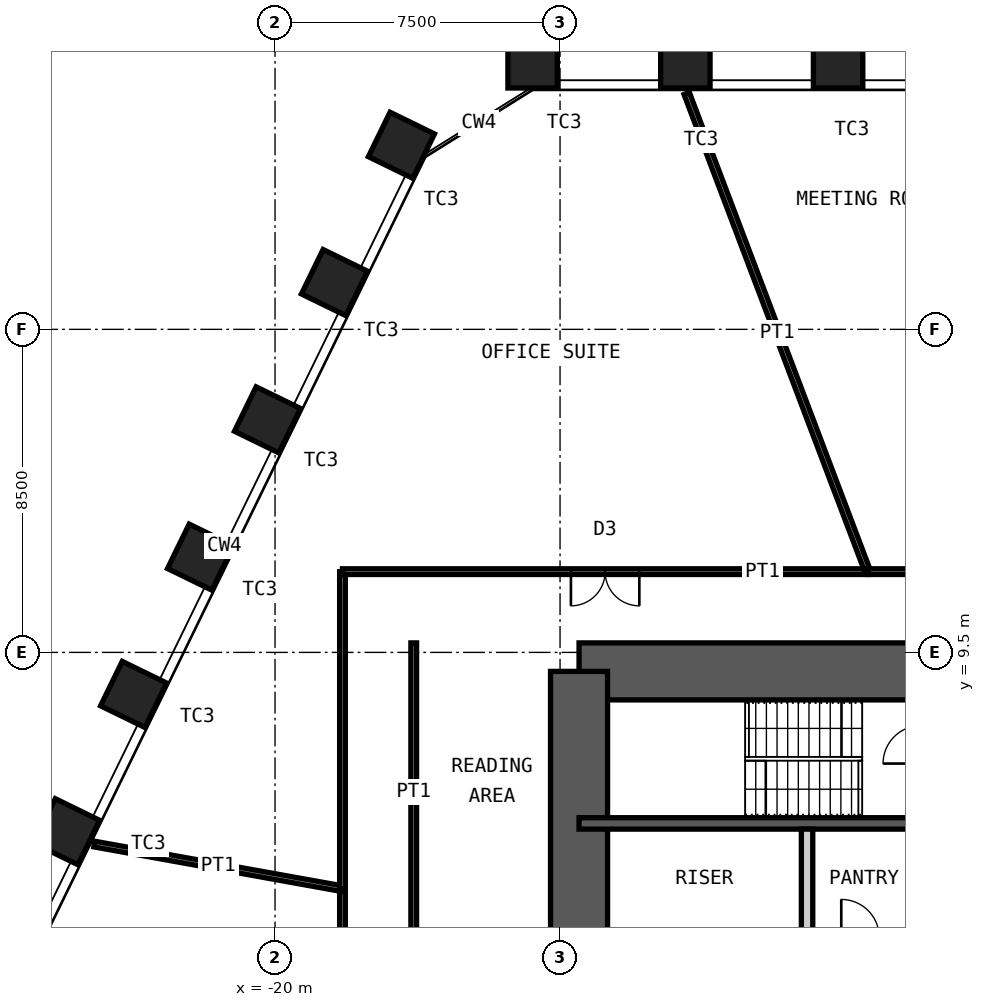
"""IFC4 building model, lengths in metres.
Left out: names, types, materials, properties, quantities, classifications, styles, units other than length and angle.
Written with IfcOpenShell. Run it as: python <this file> out.ifc"""

import sys

from ifc_helpers import new_model, si_unit, direction, frame, frame_2d, origin, origin_2d, place, context, subcontext, project, spatial, rectangle, hollow_rectangle, extrude, element, fill, save


model = new_model("IFC4")
c1 = context("Model", 3, precision=1e-05, world=origin(), true_north=direction((0.0, 1.0)))
c2 = subcontext(c1, "Body", "Model", "MODEL_VIEW")
j1 = project(units=[si_unit("LENGTHUNIT", "METRE"), si_unit("PLANEANGLEUNIT", "RADIAN")], contexts=[c1])
p1 = place(None, origin())
s1 = spatial("IfcSite", under=j1, at=p1, CompositionType="ELEMENT")
p2 = place(p1, origin())
s2 = spatial("IfcBuilding", under=s1, at=p2, CompositionType="ELEMENT")
p3 = place(p2, frame((0.0, 0.0, 107.2)))
s3 = spatial("IfcBuildingStorey", under=s2, at=p3, CompositionType="ELEMENT", Elevation=107.2)
for number, where, z_axis, x_axis in (
    (1, (-13.222, 25.0, 0.0), (0.0, 0.0, 1.0), (-1.0, 0.0, 0.0)),
    (2, (-9.203, 25.0, 0.0), (0.0, 0.0, 1.0), (-1.0, 0.0, 0.0)),
    (3, (-5.184, 25.0, 0.0), (0.0, 0.0, 1.0), (-1.0, 0.0, 0.0)),
    (4, (-25.483, 4.781, 0.0), (0.0, 0.0, 1.0), (-0.438, -0.899, 0.0)),
    (5, (-23.721, 8.394, 0.0), (0.0, 0.0, 1.0), (-0.438, -0.899, 0.0)),
    (6, (-21.959, 12.006, 0.0), (0.0, 0.0, 1.0), (-0.438, -0.899, 0.0)),
    (7, (-20.198, 15.618, 0.0), (0.0, 0.0, 1.0), (-0.438, -0.899, 0.0)),
    (8, (-18.436, 19.23, 0.0), (0.0, 0.0, 1.0), (-0.438, -0.899, 0.0)),
    (9, (-16.674, 22.843, 0.0), (0.0, 0.0, 1.0), (-0.438, -0.899, 0.0)),
):
    element("IfcColumn", number, at=place(p3, frame(where, z_axis=z_axis, x_axis=x_axis)), inside=s3, PredefinedType="COLUMN", context=c2, shape_type="SweptSolid", body=[
        extrude(hollow_rectangle(XDim=1.3, YDim=1.3, WallThickness=0.1, at=origin_2d()), origin(), (0.0, 0.0, 1.0), 4.2),
    ])
p4 = place(p3, frame((-12.0, 9.0, 0.0), z_axis=(0.0, 0.0, 1.0), x_axis=(1.0, 0.0, 0.0)))
e10 = element("IfcWall", 10, at=p4, inside=s3, PredefinedType="SHEAR", context=c2, shape_type="SweptSolid", body=[
    extrude(rectangle(XDim=24.0, YDim=1.5, at=frame_2d((12.0, 0.0))), origin(), (0.0, 0.0, 1.0), 4.2),
])
p5 = place(p4, frame((10.4, 0.0, 0.0)))
e11 = element("IfcOpeningElement", 11, at=p5, cuts=e10, PredefinedType="OPENING", context=c2, shape_type="SweptSolid", body=[
    extrude(rectangle(XDim=1.0, YDim=2.1, at=frame_2d((0.5, 1.05))), frame((0.0, 0.76, 0.0), z_axis=(0.0, -1.0, 0.0), x_axis=(1.0, 0.0, 0.0)), (0.0, 0.0, 1.0), 1.52),
])
p6 = place(p4, frame((17.6, 0.0, 0.0)))
e12 = element("IfcOpeningElement", 12, at=p6, cuts=e10, PredefinedType="OPENING", context=c2, shape_type="SweptSolid", body=[
    extrude(rectangle(XDim=0.9, YDim=2.1, at=frame_2d((0.45, 1.05))), frame((0.0, 0.76, 0.0), z_axis=(0.0, -1.0, 0.0), x_axis=(1.0, 0.0, 0.0)), (0.0, 0.0, 1.0), 1.52),
])
p7 = place(p4, frame((21.9, 0.0, 0.0)))
e13 = element("IfcOpeningElement", 13, at=p7, cuts=e10, PredefinedType="OPENING", context=c2, shape_type="SweptSolid", body=[
    extrude(rectangle(XDim=0.9, YDim=2.1, at=frame_2d((0.45, 1.05))), frame((0.0, 0.76, 0.0), z_axis=(0.0, -1.0, 0.0), x_axis=(1.0, 0.0, 0.0)), (0.0, 0.0, 1.0), 1.52),
])
p8 = place(p3, frame((-12.0, -9.0, 0.0), z_axis=(0.0, 0.0, 1.0), x_axis=(0.0, 1.0, 0.0)))
e14 = element("IfcWall", 14, at=p8, inside=s3, PredefinedType="SHEAR", context=c2, shape_type="SweptSolid", body=[
    extrude(rectangle(XDim=18.0, YDim=1.5, at=frame_2d((9.0, 0.0))), origin(), (0.0, 0.0, 1.0), 4.2),
])
p9 = place(p8, frame((8.1, 0.0, 0.0)))
e15 = element("IfcOpeningElement", 15, at=p9, cuts=e14, PredefinedType="OPENING", context=c2, shape_type="SweptSolid", body=[
    extrude(rectangle(XDim=1.8, YDim=2.1, at=frame_2d((0.9, 1.05))), frame((0.0, 0.76, 0.0), z_axis=(0.0, -1.0, 0.0), x_axis=(1.0, 0.0, 0.0)), (0.0, 0.0, 1.0), 1.52),
])
p10 = place(p3, frame((-12.0, 5.0, 0.0), z_axis=(0.0, 0.0, 1.0), x_axis=(1.0, 0.0, 0.0)))
e16 = element("IfcWall", 16, at=p10, inside=s3, PredefinedType="SHEAR", context=c2, shape_type="SweptSolid", body=[
    extrude(rectangle(XDim=24.0, YDim=0.3, at=frame_2d((12.0, 0.0))), origin(), (0.0, 0.0, 1.0), 4.2),
])
p11 = place(p3, frame((-6.0, 2.2, 0.0), z_axis=(0.0, 0.0, 1.0), x_axis=(0.0, 1.0, 0.0)))
e17 = element("IfcWall", 17, at=p11, inside=s3, PredefinedType="PARTITIONING", context=c2, shape_type="SweptSolid", body=[
    extrude(rectangle(XDim=2.65, YDim=0.3, at=frame_2d((1.325, 0.0))), origin(), (0.0, 0.0, 1.0), 3.98),
])
p12 = place(p3, frame((-18.225, -11.625, 0.0), z_axis=(0.0, 0.0, 1.0), x_axis=(0.0, 1.0, 0.0)))
e18 = element("IfcWall", 18, at=p12, inside=s3, PredefinedType="PARTITIONING", context=c2, shape_type="SweptSolid", body=[
    extrude(rectangle(XDim=14.906, YDim=0.15, at=frame_2d((7.453, 0.0))), origin(), (0.0, 0.0, 1.0), 4.03),
])
p13 = place(p12, frame((6.553, 0.0, 0.0)))
e19 = element("IfcOpeningElement", 19, at=p13, cuts=e18, PredefinedType="OPENING", context=c2, shape_type="SweptSolid", body=[
    extrude(rectangle(XDim=1.8, YDim=2.4, at=frame_2d((0.9, 1.2))), frame((0.0, 0.085, 0.0), z_axis=(0.0, -1.0, 0.0), x_axis=(1.0, 0.0, 0.0)), (0.0, 0.0, 1.0), 0.17),
])
p14 = place(p3, frame((-24.755, 4.457, 0.0), z_axis=(0.0, 0.0, 1.0), x_axis=(0.984174598206, -0.177201467959, 0.0)))
e20 = element("IfcWall", 20, at=p14, inside=s3, PredefinedType="PARTITIONING", context=c2, shape_type="SweptSolid", body=[
    extrude(rectangle(XDim=6.635, YDim=0.15, at=frame_2d((3.318, 0.0))), origin(), (0.0, 0.0, 1.0), 3.33),
])
p15 = place(p3, frame((-18.225, 3.281, 0.0), z_axis=(0.0, 0.0, 1.0), x_axis=(0.0, 1.0, 0.0)))
e21 = element("IfcWall", 21, at=p15, inside=s3, PredefinedType="PARTITIONING", context=c2, shape_type="SweptSolid", body=[
    extrude(rectangle(XDim=8.344, YDim=0.15, at=frame_2d((4.172, 0.0))), origin(), (0.0, 0.0, 1.0), 4.03),
])
p16 = place(p3, frame((-18.225, 11.625, 0.0), z_axis=(0.0, 0.0, 1.0), x_axis=(1.0, 0.0, 0.0)))
e22 = element("IfcWall", 22, at=p16, inside=s3, PredefinedType="PARTITIONING", context=c2, shape_type="SweptSolid", body=[
    extrude(rectangle(XDim=13.823, YDim=0.15, at=frame_2d((6.911, 0.0))), origin(), (0.0, 0.0, 1.0), 4.03),
])
p17 = place(p16, frame((6.011, 0.0, 0.0)))
e23 = element("IfcOpeningElement", 23, at=p17, cuts=e22, PredefinedType="OPENING", context=c2, shape_type="SweptSolid", body=[
    extrude(rectangle(XDim=1.8, YDim=2.4, at=frame_2d((0.9, 1.2))), frame((0.0, 0.085, 0.0), z_axis=(0.0, -1.0, 0.0), x_axis=(1.0, 0.0, 0.0)), (0.0, 0.0, 1.0), 0.17),
])
p18 = place(p3, frame((-9.167, 24.207, 0.0), z_axis=(0.0, 0.0, 1.0), x_axis=(0.354156368181, -0.935186220427, 0.0)))
e24 = element("IfcWall", 24, at=p18, inside=s3, PredefinedType="PARTITIONING", context=c2, shape_type="SweptSolid", body=[
    extrude(rectangle(XDim=13.454, YDim=0.15, at=frame_2d((6.727, 0.0))), origin(), (0.0, 0.0, 1.0), 3.33),
])
p19 = place(p3, frame((-4.403, 11.625, 0.0), z_axis=(0.0, 0.0, 1.0), x_axis=(1.0, 0.0, 0.0)))
e25 = element("IfcWall", 25, at=p19, inside=s3, PredefinedType="PARTITIONING", context=c2, shape_type="SweptSolid", body=[
    extrude(rectangle(XDim=3.845, YDim=0.15, at=frame_2d((1.923, 0.0))), origin(), (0.0, 0.0, 1.0), 4.03),
])
p20 = place(p19, frame((1.423, 0.0, 0.0)))
e26 = element("IfcOpeningElement", 26, at=p20, cuts=e25, PredefinedType="OPENING", context=c2, shape_type="SweptSolid", body=[
    extrude(rectangle(XDim=1.0, YDim=2.4, at=frame_2d((0.5, 1.2))), frame((0.0, 0.085, 0.0), z_axis=(0.0, -1.0, 0.0), x_axis=(1.0, 0.0, 0.0)), (0.0, 0.0, 1.0), 0.17),
])
p21 = place(p3, frame((-16.35, 1.9, 0.0), z_axis=(0.0, 0.0, 1.0), x_axis=(0.0, 1.0, 0.0)))
e27 = element("IfcWall", 27, at=p21, inside=s3, PredefinedType="PARTITIONING", context=c2, shape_type="SweptSolid", body=[
    extrude(rectangle(XDim=7.85, YDim=0.15, at=frame_2d((3.925, 0.0))), origin(), (0.0, 0.0, 1.0), 4.03),
])
p22 = place(p17, origin())
e28 = element("IfcDoor", 28, at=p22, inside=s3, OperationType="DOUBLE_DOOR_DOUBLE_SWING", PredefinedType="DOOR", context=c2, shape_type="SweptSolid", body=[
    extrude(rectangle(XDim=1.8, YDim=2.4, at=frame_2d((0.9, 1.2))), frame((0.0, 0.025, 0.0), z_axis=(0.0, -1.0, 0.0), x_axis=(1.0, 0.0, 0.0)), (0.0, 0.0, 1.0), 0.05),
])
fill(e23, e28)
save(model, sys.argv[1])
